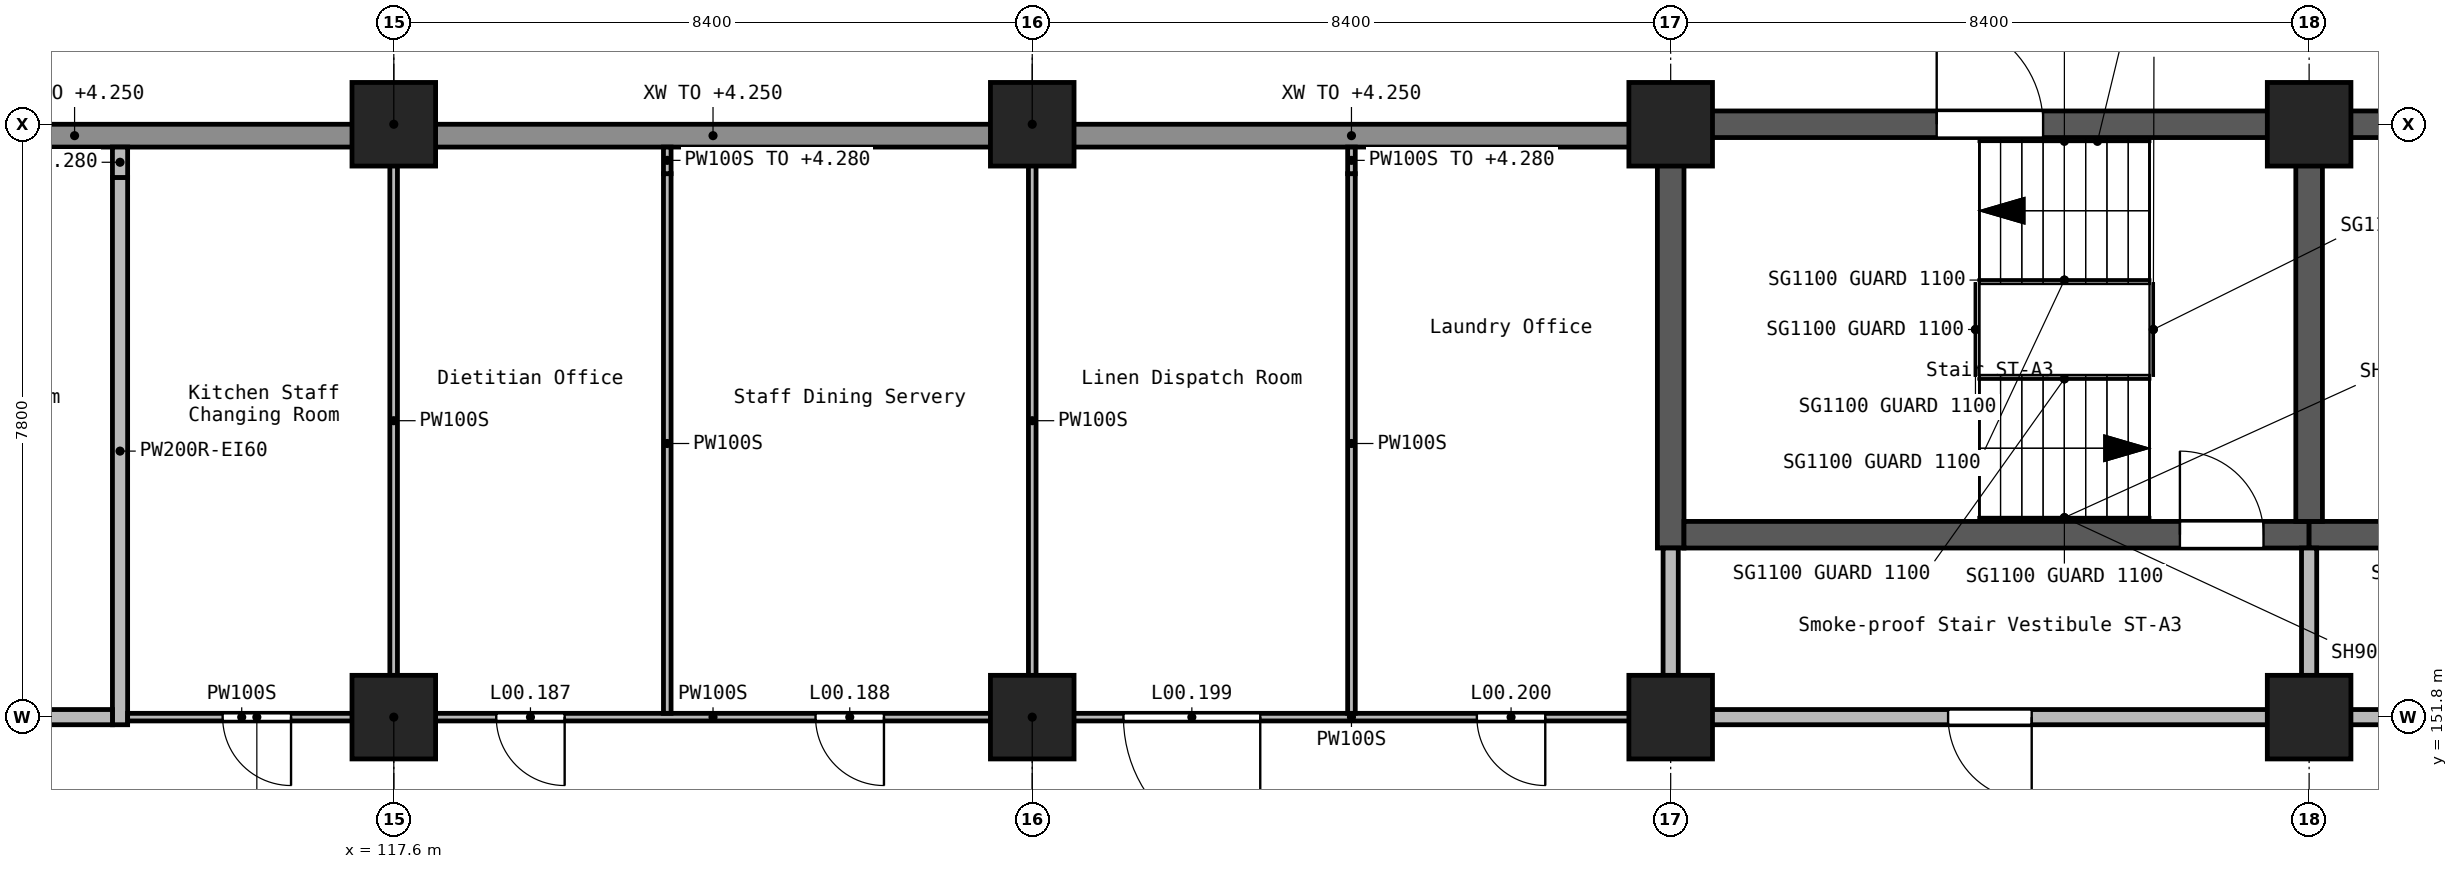
"""IFC4 building model, lengths in metres.
Left out: names, types, materials, properties, quantities, classifications, styles, units other than length and angle.
Written with IfcOpenShell. Run it as: python <this file> out.ifc"""

import sys

from ifc_helpers import new_model, si_unit, direction, frame, frame_2d, origin, origin_2d, place, context, subcontext, project, spatial, rectangle, extrude, element, fill, save


model = new_model("IFC4")
c1 = context("Model", 3, precision=1e-05, world=origin(), true_north=direction((0.0, 1.0)))
c2 = subcontext(c1, "Body", "Model", "MODEL_VIEW")
j1 = project(units=[si_unit("LENGTHUNIT", "METRE"), si_unit("PLANEANGLEUNIT", "RADIAN")], contexts=[c1])
p1 = place(None, origin())
s1 = spatial("IfcSite", under=j1, at=p1, CompositionType="ELEMENT")
p2 = place(p1, origin())
s2 = spatial("IfcBuilding", under=s1, at=p2, CompositionType="ELEMENT")
p3 = place(p2, origin())
s3 = spatial("IfcBuildingStorey", under=s2, at=p3, CompositionType="ELEMENT", Elevation=0.0)
for number, where, z_axis, x_axis in (
    (1, (117.6, 151.8, -0.3), (0.0, 0.0, 1.0), (1.0, 0.0, 0.0)),
    (2, (117.6, 159.6, -0.3), (0.0, 0.0, 1.0), (1.0, 0.0, 0.0)),
    (3, (126.0, 151.8, -0.3), (0.0, 0.0, 1.0), (1.0, 0.0, 0.0)),
    (4, (126.0, 159.6, -0.3), (0.0, 0.0, 1.0), (1.0, 0.0, 0.0)),
    (5, (134.4, 151.8, -0.3), (0.0, 0.0, 1.0), (1.0, 0.0, 0.0)),
    (6, (134.4, 159.6, -0.3), (0.0, 0.0, 1.0), (1.0, 0.0, 0.0)),
    (7, (142.8, 151.8, -0.3), (0.0, 0.0, 1.0), (1.0, 0.0, 0.0)),
    (8, (142.8, 159.6, -0.3), (0.0, 0.0, 1.0), (1.0, 0.0, 0.0)),
):
    element("IfcColumn", number, at=place(p3, frame(where, z_axis=z_axis, x_axis=x_axis)), inside=s3, PredefinedType="COLUMN", context=c2, shape_type="SweptSolid", body=[
        extrude(rectangle(XDim=1.1, YDim=1.1, at=origin_2d()), origin(), (0.0, 0.0, 1.0), 5.7),
    ])
p4 = place(p3, frame((134.225, 159.6, -0.3), z_axis=(0.0, 0.0, 1.0), x_axis=(1.0, 0.0, 0.0)))
e9 = element("IfcWall", 9, at=p4, inside=s3, PredefinedType="SHEAR", context=c2, shape_type="SweptSolid", body=[
    extrude(rectangle(XDim=8.575, YDim=0.35, at=frame_2d((4.288, 0.0))), origin(), (0.0, 0.0, 1.0), 5.7),
])
p5 = place(p4, frame((3.675, 0.0, 0.3)))
e10 = element("IfcOpeningElement", 10, at=p5, cuts=e9, PredefinedType="OPENING", context=c2, shape_type="SweptSolid", body=[
    extrude(rectangle(XDim=1.4, YDim=2.1, at=frame_2d((0.7, 1.05))), frame((0.0, 0.185, 0.0), z_axis=(0.0, -1.0, 0.0), x_axis=(1.0, 0.0, 0.0)), (0.0, 0.0, 1.0), 0.37),
])
p6 = place(p3, frame((134.4, 154.025, -0.3), z_axis=(0.0, 0.0, 1.0), x_axis=(0.0, 1.0, 0.0)))
e11 = element("IfcWall", 11, at=p6, inside=s3, PredefinedType="SHEAR", context=c2, shape_type="SweptSolid", body=[
    extrude(rectangle(XDim=5.4, YDim=0.35, at=frame_2d((2.7, 0.0))), origin(), (0.0, 0.0, 1.0), 5.7),
])
p7 = place(p3, frame((134.575, 154.2, -0.3), z_axis=(0.0, 0.0, 1.0), x_axis=(1.0, 0.0, 0.0)))
e12 = element("IfcWall", 12, at=p7, inside=s3, PredefinedType="SHEAR", context=c2, shape_type="SweptSolid", body=[
    extrude(rectangle(XDim=8.225, YDim=0.35, at=frame_2d((4.113, 0.0))), origin(), (0.0, 0.0, 1.0), 5.7),
])
p8 = place(p7, frame((6.525, 0.0, 0.3)))
e13 = element("IfcOpeningElement", 13, at=p8, cuts=e12, PredefinedType="OPENING", context=c2, shape_type="SweptSolid", body=[
    extrude(rectangle(XDim=1.1, YDim=2.1, at=frame_2d((0.55, 1.05))), frame((0.0, 0.185, 0.0), z_axis=(0.0, -1.0, 0.0), x_axis=(1.0, 0.0, 0.0)), (0.0, 0.0, 1.0), 0.37),
])
p9 = place(p3, frame((142.8, 154.2, -0.3), z_axis=(0.0, 0.0, 1.0), x_axis=(1.0, 0.0, 0.0)))
e14 = element("IfcWall", 14, at=p9, inside=s3, PredefinedType="SHEAR", context=c2, shape_type="SweptSolid", body=[
    extrude(rectangle(XDim=8.4, YDim=0.35, at=frame_2d((4.2, 0.0))), origin(), (0.0, 0.0, 1.0), 5.7),
])
p10 = place(p9, frame((6.7, 0.0, 0.3)))
e15 = element("IfcOpeningElement", 15, at=p10, cuts=e14, PredefinedType="OPENING", context=c2, shape_type="SweptSolid", body=[
    extrude(rectangle(XDim=1.1, YDim=2.1, at=frame_2d((0.55, 1.05))), frame((0.0, 0.185, 0.0), z_axis=(0.0, -1.0, 0.0), x_axis=(1.0, 0.0, 0.0)), (0.0, 0.0, 1.0), 0.37),
])
p11 = place(p3, frame((142.8, 154.375, -0.3), z_axis=(0.0, 0.0, 1.0), x_axis=(0.0, 1.0, 0.0)))
e16 = element("IfcWall", 16, at=p11, inside=s3, PredefinedType="SHEAR", context=c2, shape_type="SweptSolid", body=[
    extrude(rectangle(XDim=5.05, YDim=0.35, at=frame_2d((2.525, 0.0))), origin(), (0.0, 0.0, 1.0), 5.7),
])
p12 = place(p3, frame((142.8, 159.6, -0.3), z_axis=(0.0, 0.0, 1.0), x_axis=(1.0, 0.0, 0.0)))
e17 = element("IfcWall", 17, at=p12, inside=s3, PredefinedType="SHEAR", context=c2, shape_type="SweptSolid", body=[
    extrude(rectangle(XDim=8.4, YDim=0.35, at=frame_2d((4.2, 0.0))), origin(), (0.0, 0.0, 1.0), 5.7),
])
p13 = place(p12, frame((3.5, 0.0, 0.3)))
e18 = element("IfcOpeningElement", 18, at=p13, cuts=e17, PredefinedType="OPENING", context=c2, shape_type="SweptSolid", body=[
    extrude(rectangle(XDim=1.4, YDim=2.1, at=frame_2d((0.7, 1.05))), frame((0.0, 0.185, 0.0), z_axis=(0.0, -1.0, 0.0), x_axis=(1.0, 0.0, 0.0)), (0.0, 0.0, 1.0), 0.37),
])
for number, where, z_axis, x_axis in (
    (19, (133.9, 159.45, 0.0), (0.0, 0.0, 1.0), (-1.0, 0.0, 0.0)),
    (20, (125.5, 159.45, 0.0), (0.0, 0.0, 1.0), (-1.0, 0.0, 0.0)),
):
    element("IfcWall", number, at=place(p3, frame(where, z_axis=z_axis, x_axis=x_axis)), inside=s3, PredefinedType="STANDARD", context=c2, shape_type="SweptSolid", body=[
        extrude(rectangle(XDim=7.4, YDim=0.3, at=frame_2d((3.7, 0.0))), origin(), (0.0, 0.0, 1.0), 4.25),
    ])
p14 = place(p3, frame((117.1, 159.45, 0.0), z_axis=(0.0, 0.0, 1.0), x_axis=(-1.0, 0.0, 0.0)))
e21 = element("IfcWall", 21, at=p14, inside=s3, PredefinedType="STANDARD", context=c2, shape_type="SweptSolid", body=[
    extrude(rectangle(XDim=7.4, YDim=0.3, at=frame_2d((3.7, 0.0))), origin(), (0.0, 0.0, 1.0), 4.25),
])
p15 = place(p3, frame((150.7, 151.8, 0.0), z_axis=(0.0, 0.0, 1.0), x_axis=(-1.0, 0.0, 0.0)))
e22 = element("IfcWall", 22, at=p15, inside=s3, PredefinedType="SOLIDWALL", context=c2, shape_type="SweptSolid", body=[
    extrude(rectangle(XDim=7.4, YDim=0.2, at=frame_2d((3.7, 0.0))), origin(), (0.0, 0.0, 1.0), 5.05),
])
p16 = place(p15, frame((3.15, 0.0, 0.0)))
e23 = element("IfcOpeningElement", 23, at=p16, cuts=e22, PredefinedType="OPENING", context=c2, shape_type="SweptSolid", body=[
    extrude(rectangle(XDim=1.1, YDim=2.1, at=frame_2d((0.55, 1.05))), frame((0.0, 0.11, 0.0), z_axis=(0.0, -1.0, 0.0), x_axis=(1.0, 0.0, 0.0)), (0.0, 0.0, 1.0), 0.22),
])
p17 = place(p3, frame((142.3, 151.8, 0.0), z_axis=(0.0, 0.0, 1.0), x_axis=(-1.0, 0.0, 0.0)))
e24 = element("IfcWall", 24, at=p17, inside=s3, PredefinedType="SOLIDWALL", context=c2, shape_type="SweptSolid", body=[
    extrude(rectangle(XDim=7.4, YDim=0.2, at=frame_2d((3.7, 0.0))), origin(), (0.0, 0.0, 1.0), 5.05),
])
p18 = place(p17, frame((3.15, 0.0, 0.0)))
e25 = element("IfcOpeningElement", 25, at=p18, cuts=e24, PredefinedType="OPENING", context=c2, shape_type="SweptSolid", body=[
    extrude(rectangle(XDim=1.1, YDim=2.1, at=frame_2d((0.55, 1.05))), frame((0.0, 0.11, 0.0), z_axis=(0.0, -1.0, 0.0), x_axis=(1.0, 0.0, 0.0)), (0.0, 0.0, 1.0), 0.22),
])
p19 = place(p3, frame((113.998, 151.7, 0.0), z_axis=(0.0, 0.0, 1.0), x_axis=(0.0, 1.0, 0.0)))
e26 = element("IfcWall", 26, at=p19, inside=s3, PredefinedType="SOLIDWALL", context=c2, shape_type="SweptSolid", body=[
    extrude(rectangle(XDim=7.2, YDim=0.2, at=frame_2d((3.6, 0.0))), origin(), (0.0, 0.0, 1.0), 5.05),
])
p20 = place(p3, frame((113.998, 158.9, 0.0), z_axis=(0.0, 0.0, 1.0), x_axis=(0.0, 1.0, 0.0)))
e27 = element("IfcWall", 27, at=p20, inside=s3, PredefinedType="SOLIDWALL", context=c2, shape_type="SweptSolid", body=[
    extrude(rectangle(XDim=0.4, YDim=0.2, at=frame_2d((0.2, 0.0))), origin(), (0.0, 0.0, 1.0), 4.28),
])
p21 = place(p3, frame((109.7, 151.8, 0.0), z_axis=(0.0, 0.0, 1.0), x_axis=(1.0, 0.0, 0.0)))
e28 = element("IfcWall", 28, at=p21, inside=s3, PredefinedType="SOLIDWALL", context=c2, shape_type="SweptSolid", body=[
    extrude(rectangle(XDim=4.198, YDim=0.2, at=frame_2d((2.099, 0.0))), origin(), (0.0, 0.0, 1.0), 5.05),
])
p22 = place(p21, frame((1.399, 0.0, 0.0)))
e29 = element("IfcOpeningElement", 29, at=p22, cuts=e28, PredefinedType="OPENING", context=c2, shape_type="SweptSolid", body=[
    extrude(rectangle(XDim=1.0, YDim=2.1, at=frame_2d((0.5, 1.05))), frame((0.0, 0.11, 0.0), z_axis=(0.0, -1.0, 0.0), x_axis=(1.0, 0.0, 0.0)), (0.0, 0.0, 1.0), 0.22),
])
for number, where, z_axis, x_axis in (
    (30, (134.4, 152.3, 0.0), (0.0, 0.0, 1.0), (0.0, 1.0, 0.0)),
    (31, (142.8, 152.3, 0.0), (0.0, 0.0, 1.0), (0.0, 1.0, 0.0)),
):
    element("IfcWall", number, at=place(p3, frame(where, z_axis=z_axis, x_axis=x_axis)), inside=s3, PredefinedType="SOLIDWALL", context=c2, shape_type="SweptSolid", body=[
        extrude(rectangle(XDim=1.725, YDim=0.2, at=frame_2d((0.862, 0.0))), origin(), (0.0, 0.0, 1.0), 5.05),
    ])
p23 = place(p3, frame((133.9, 151.8, 0.0), z_axis=(0.0, 0.0, 1.0), x_axis=(-1.0, 0.0, 0.0)))
e32 = element("IfcWall", 32, at=p23, inside=s3, PredefinedType="PARTITIONING", context=c2, shape_type="SweptSolid", body=[
    extrude(rectangle(XDim=7.4, YDim=0.1, at=frame_2d((3.7, 0.0))), origin(), (0.0, 0.0, 1.0), 5.05),
])
p24 = place(p23, frame((4.9, 0.0, 0.0)))
e33 = element("IfcOpeningElement", 33, at=p24, cuts=e32, PredefinedType="OPENING", context=c2, shape_type="SweptSolid", body=[
    extrude(rectangle(XDim=1.8, YDim=2.1, at=frame_2d((0.9, 1.05))), frame((0.0, 0.06, 0.0), z_axis=(0.0, -1.0, 0.0), x_axis=(1.0, 0.0, 0.0)), (0.0, 0.0, 1.0), 0.12),
])
p25 = place(p23, frame((1.15, 0.0, 0.0)))
e34 = element("IfcOpeningElement", 34, at=p25, cuts=e32, PredefinedType="OPENING", context=c2, shape_type="SweptSolid", body=[
    extrude(rectangle(XDim=0.9, YDim=2.1, at=frame_2d((0.45, 1.05))), frame((0.0, 0.06, 0.0), z_axis=(0.0, -1.0, 0.0), x_axis=(1.0, 0.0, 0.0)), (0.0, 0.0, 1.0), 0.12),
])
p26 = place(p3, frame((125.5, 151.8, 0.0), z_axis=(0.0, 0.0, 1.0), x_axis=(-1.0, 0.0, 0.0)))
e35 = element("IfcWall", 35, at=p26, inside=s3, PredefinedType="PARTITIONING", context=c2, shape_type="SweptSolid", body=[
    extrude(rectangle(XDim=7.4, YDim=0.1, at=frame_2d((3.7, 0.0))), origin(), (0.0, 0.0, 1.0), 5.05),
])
p27 = place(p26, frame((5.652, 0.0, 0.0)))
e36 = element("IfcOpeningElement", 36, at=p27, cuts=e35, PredefinedType="OPENING", context=c2, shape_type="SweptSolid", body=[
    extrude(rectangle(XDim=0.9, YDim=2.1, at=frame_2d((0.45, 1.05))), frame((0.0, 0.06, 0.0), z_axis=(0.0, -1.0, 0.0), x_axis=(1.0, 0.0, 0.0)), (0.0, 0.0, 1.0), 0.12),
])
p28 = place(p26, frame((1.451, 0.0, 0.0)))
e37 = element("IfcOpeningElement", 37, at=p28, cuts=e35, PredefinedType="OPENING", context=c2, shape_type="SweptSolid", body=[
    extrude(rectangle(XDim=0.9, YDim=2.1, at=frame_2d((0.45, 1.05))), frame((0.0, 0.06, 0.0), z_axis=(0.0, -1.0, 0.0), x_axis=(1.0, 0.0, 0.0)), (0.0, 0.0, 1.0), 0.12),
])
p29 = place(p3, frame((117.1, 151.8, 0.0), z_axis=(0.0, 0.0, 1.0), x_axis=(-1.0, 0.0, 0.0)))
e38 = element("IfcWall", 38, at=p29, inside=s3, PredefinedType="PARTITIONING", context=c2, shape_type="SweptSolid", body=[
    extrude(rectangle(XDim=3.002, YDim=0.1, at=frame_2d((1.501, 0.0))), origin(), (0.0, 0.0, 1.0), 5.05),
])
p30 = place(p29, frame((0.852, 0.0, 0.0)))
e39 = element("IfcOpeningElement", 39, at=p30, cuts=e38, PredefinedType="OPENING", context=c2, shape_type="SweptSolid", body=[
    extrude(rectangle(XDim=0.9, YDim=2.1, at=frame_2d((0.45, 1.05))), frame((0.0, 0.06, 0.0), z_axis=(0.0, -1.0, 0.0), x_axis=(1.0, 0.0, 0.0)), (0.0, 0.0, 1.0), 0.12),
])
p31 = place(p3, frame((117.598, 152.3, 0.0), z_axis=(0.0, 0.0, 1.0), x_axis=(0.0, 1.0, 0.0)))
e40 = element("IfcWall", 40, at=p31, inside=s3, PredefinedType="PARTITIONING", context=c2, shape_type="SweptSolid", body=[
    extrude(rectangle(XDim=6.8, YDim=0.1, at=frame_2d((3.4, 0.0))), origin(), (0.0, 0.0, 1.0), 5.05),
])
p32 = place(p3, frame((121.198, 151.85, 0.0), z_axis=(0.0, 0.0, 1.0), x_axis=(0.0, 1.0, 0.0)))
e41 = element("IfcWall", 41, at=p32, inside=s3, PredefinedType="PARTITIONING", context=c2, shape_type="SweptSolid", body=[
    extrude(rectangle(XDim=7.1, YDim=0.1, at=frame_2d((3.55, 0.0))), origin(), (0.0, 0.0, 1.0), 5.05),
])
p33 = place(p3, frame((121.198, 158.95, 0.0), z_axis=(0.0, 0.0, 1.0), x_axis=(0.0, 1.0, 0.0)))
e42 = element("IfcWall", 42, at=p33, inside=s3, PredefinedType="PARTITIONING", context=c2, shape_type="SweptSolid", body=[
    extrude(rectangle(XDim=0.35, YDim=0.1, at=frame_2d((0.175, 0.0))), origin(), (0.0, 0.0, 1.0), 4.28),
])
p34 = place(p3, frame((126.0, 152.3, 0.0), z_axis=(0.0, 0.0, 1.0), x_axis=(0.0, 1.0, 0.0)))
e43 = element("IfcWall", 43, at=p34, inside=s3, PredefinedType="PARTITIONING", context=c2, shape_type="SweptSolid", body=[
    extrude(rectangle(XDim=6.8, YDim=0.1, at=frame_2d((3.4, 0.0))), origin(), (0.0, 0.0, 1.0), 5.05),
])
p35 = place(p3, frame((130.2, 151.85, 0.0), z_axis=(0.0, 0.0, 1.0), x_axis=(0.0, 1.0, 0.0)))
e44 = element("IfcWall", 44, at=p35, inside=s3, PredefinedType="PARTITIONING", context=c2, shape_type="SweptSolid", body=[
    extrude(rectangle(XDim=7.1, YDim=0.1, at=frame_2d((3.55, 0.0))), origin(), (0.0, 0.0, 1.0), 5.05),
])
p36 = place(p3, frame((130.2, 158.95, 0.0), z_axis=(0.0, 0.0, 1.0), x_axis=(0.0, 1.0, 0.0)))
e45 = element("IfcWall", 45, at=p36, inside=s3, PredefinedType="PARTITIONING", context=c2, shape_type="SweptSolid", body=[
    extrude(rectangle(XDim=0.35, YDim=0.1, at=frame_2d((0.175, 0.0))), origin(), (0.0, 0.0, 1.0), 4.28),
])
p37 = place(p5, origin())
e46 = element("IfcDoor", 46, at=p37, inside=s3, OperationType="SINGLE_SWING_LEFT", PredefinedType="DOOR", context=c2, shape_type="SweptSolid", body=[
    extrude(rectangle(XDim=1.4, YDim=2.1, at=frame_2d((0.7, 1.05))), frame((0.0, 0.025, 0.0), z_axis=(0.0, -1.0, 0.0), x_axis=(1.0, 0.0, 0.0)), (0.0, 0.0, 1.0), 0.05),
])
fill(e10, e46)
p38 = place(p8, origin())
e47 = element("IfcDoor", 47, at=p38, inside=s3, OperationType="SINGLE_SWING_RIGHT", PredefinedType="DOOR", context=c2, shape_type="SweptSolid", body=[
    extrude(rectangle(XDim=1.1, YDim=2.1, at=frame_2d((0.55, 1.05))), frame((0.0, 0.025, 0.0), z_axis=(0.0, -1.0, 0.0), x_axis=(1.0, 0.0, 0.0)), (0.0, 0.0, 1.0), 0.05),
])
fill(e13, e47)
p39 = place(p18, frame((1.1, 0.0, 0.0), z_axis=(0.0, 0.0, 1.0), x_axis=(-1.0, 0.0, 0.0)))
e48 = element("IfcDoor", 48, at=p39, inside=s3, OperationType="SINGLE_SWING_RIGHT", PredefinedType="DOOR", context=c2, shape_type="SweptSolid", body=[
    extrude(rectangle(XDim=1.1, YDim=2.1, at=frame_2d((0.55, 1.05))), frame((0.0, 0.025, 0.0), z_axis=(0.0, -1.0, 0.0), x_axis=(1.0, 0.0, 0.0)), (0.0, 0.0, 1.0), 0.05),
])
fill(e25, e48)
p40 = place(p30, frame((0.9, 0.0, 0.0), z_axis=(0.0, 0.0, 1.0), x_axis=(-1.0, 0.0, 0.0)))
e49 = element("IfcDoor", 49, at=p40, inside=s3, OperationType="SINGLE_SWING_RIGHT", PredefinedType="DOOR", context=c2, shape_type="SweptSolid", body=[
    extrude(rectangle(XDim=0.9, YDim=2.1, at=frame_2d((0.45, 1.05))), frame((0.0, 0.025, 0.0), z_axis=(0.0, -1.0, 0.0), x_axis=(1.0, 0.0, 0.0)), (0.0, 0.0, 1.0), 0.05),
])
fill(e39, e49)
p41 = place(p27, frame((0.9, 0.0, 0.0), z_axis=(0.0, 0.0, 1.0), x_axis=(-1.0, 0.0, 0.0)))
e50 = element("IfcDoor", 50, at=p41, inside=s3, OperationType="SINGLE_SWING_LEFT", PredefinedType="DOOR", context=c2, shape_type="SweptSolid", body=[
    extrude(rectangle(XDim=0.9, YDim=2.1, at=frame_2d((0.45, 1.05))), frame((0.0, 0.025, 0.0), z_axis=(0.0, -1.0, 0.0), x_axis=(1.0, 0.0, 0.0)), (0.0, 0.0, 1.0), 0.05),
])
fill(e36, e50)
p42 = place(p28, frame((0.9, 0.0, 0.0), z_axis=(0.0, 0.0, 1.0), x_axis=(-1.0, 0.0, 0.0)))
e51 = element("IfcDoor", 51, at=p42, inside=s3, OperationType="SINGLE_SWING_RIGHT", PredefinedType="DOOR", context=c2, shape_type="SweptSolid", body=[
    extrude(rectangle(XDim=0.9, YDim=2.1, at=frame_2d((0.45, 1.05))), frame((0.0, 0.025, 0.0), z_axis=(0.0, -1.0, 0.0), x_axis=(1.0, 0.0, 0.0)), (0.0, 0.0, 1.0), 0.05),
])
fill(e37, e51)
p43 = place(p24, frame((1.8, 0.0, 0.0), z_axis=(0.0, 0.0, 1.0), x_axis=(-1.0, 0.0, 0.0)))
e52 = element("IfcDoor", 52, at=p43, inside=s3, OperationType="DOUBLE_DOOR_SINGLE_SWING", PredefinedType="DOOR", context=c2, shape_type="SweptSolid", body=[
    extrude(rectangle(XDim=1.8, YDim=2.1, at=frame_2d((0.9, 1.05))), frame((0.0, 0.025, 0.0), z_axis=(0.0, -1.0, 0.0), x_axis=(1.0, 0.0, 0.0)), (0.0, 0.0, 1.0), 0.05),
])
fill(e33, e52)
p44 = place(p25, frame((0.9, 0.0, 0.0), z_axis=(0.0, 0.0, 1.0), x_axis=(-1.0, 0.0, 0.0)))
e53 = element("IfcDoor", 53, at=p44, inside=s3, OperationType="SINGLE_SWING_RIGHT", PredefinedType="DOOR", context=c2, shape_type="SweptSolid", body=[
    extrude(rectangle(XDim=0.9, YDim=2.1, at=frame_2d((0.45, 1.05))), frame((0.0, 0.025, 0.0), z_axis=(0.0, -1.0, 0.0), x_axis=(1.0, 0.0, 0.0)), (0.0, 0.0, 1.0), 0.05),
])
fill(e34, e53)
save(model, sys.argv[1])
